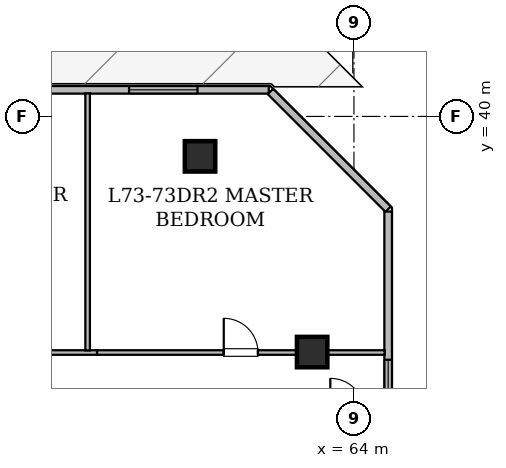
"""IFC4 building model, lengths in metres.
Left out: names, types, materials, properties, quantities, classifications, styles, units other than length and angle.
Written with IfcOpenShell. Run it as: python <this file> out.ifc"""

import sys

from ifc_helpers import new_model, si_unit, direction, frame, frame_2d, origin, origin_2d, place, context, subcontext, project, spatial, rectangle, hollow_rectangle, extrude, element, fill, save


model = new_model("IFC4")
c1 = context("Model", 3, precision=1e-05, world=origin(), true_north=direction((0.0, 1.0)))
c2 = subcontext(c1, "Body", "Model", "MODEL_VIEW")
j1 = project(units=[si_unit("LENGTHUNIT", "METRE"), si_unit("PLANEANGLEUNIT", "RADIAN")], contexts=[c1])
p1 = place(None, origin())
s1 = spatial("IfcSite", under=j1, at=p1, CompositionType="ELEMENT")
p2 = place(p1, origin())
s2 = spatial("IfcBuilding", under=s1, at=p2, CompositionType="ELEMENT")
p3 = place(p2, frame((0.0, 0.0, 286.25)))
s3 = spatial("IfcBuildingStorey", under=s2, at=p3, CompositionType="ELEMENT", Elevation=286.25)
for number, where, z_axis, x_axis in (
    (1, (59.95, 38.95, 0.025), (0.0, 0.0, 1.0), (1.0, 0.0, 0.0)),
    (2, (62.9, 33.8, 0.025), (0.0, 0.0, 1.0), (1.0, 0.0, 0.0)),
):
    element("IfcColumn", number, at=place(p3, frame(where, z_axis=z_axis, x_axis=x_axis)), inside=s3, PredefinedType="COLUMN", context=c2, shape_type="SweptSolid", body=[
        extrude(hollow_rectangle(XDim=0.8, YDim=0.8, WallThickness=0.04, at=origin_2d()), origin(), (0.0, 0.0, 1.0), 4.175),
    ])
p4 = place(p3, frame((28.302, 40.7, 0.0), z_axis=(0.0, 0.0, 1.0), x_axis=(1.0, 0.0, 0.0)))
e3 = element("IfcWall", 3, at=p4, inside=s3, PredefinedType="STANDARD", context=c2, shape_type="SweptSolid", body=[
    extrude(rectangle(XDim=33.457, YDim=0.2, at=frame_2d((16.729, 0.0))), origin(), (0.0, 0.0, 1.0), 3.95),
])
p5 = place(p4, frame((19.017, 0.0, 0.0)))
e4 = element("IfcOpeningElement", 4, at=p5, cuts=e3, PredefinedType="OPENING", context=c2, shape_type="SweptSolid", body=[
    extrude(rectangle(XDim=1.0, YDim=2.15, at=frame_2d((0.5, 1.075))), frame((0.0, 0.11, 0.0), z_axis=(0.0, -1.0, 0.0), x_axis=(1.0, 0.0, 0.0)), (0.0, 0.0, 1.0), 0.22),
])
p6 = place(p4, frame((16.033, 0.0, 0.78)))
e5 = element("IfcOpeningElement", 5, at=p6, cuts=e3, PredefinedType="OPENING", context=c2, shape_type="SweptSolid", body=[
    extrude(rectangle(XDim=1.2, YDim=1.5, at=frame_2d((0.6, 0.75))), frame((0.0, 0.11, 0.0), z_axis=(0.0, -1.0, 0.0), x_axis=(1.0, 0.0, 0.0)), (0.0, 0.0, 1.0), 0.22),
])
p7 = place(p4, frame((24.546, 0.0, 0.85)))
e6 = element("IfcOpeningElement", 6, at=p7, cuts=e3, PredefinedType="OPENING", context=c2, shape_type="SweptSolid", body=[
    extrude(rectangle(XDim=1.8, YDim=0.92, at=frame_2d((0.9, 0.46))), frame((0.0, 0.11, 0.0), z_axis=(0.0, -1.0, 0.0), x_axis=(1.0, 0.0, 0.0)), (0.0, 0.0, 1.0), 0.22),
])
p8 = place(p4, frame((29.781, 0.0, 0.85)))
e7 = element("IfcOpeningElement", 7, at=p8, cuts=e3, PredefinedType="OPENING", context=c2, shape_type="SweptSolid", body=[
    extrude(rectangle(XDim=1.8, YDim=0.92, at=frame_2d((0.9, 0.46))), frame((0.0, 0.11, 0.0), z_axis=(0.0, -1.0, 0.0), x_axis=(1.0, 0.0, 0.0)), (0.0, 0.0, 1.0), 0.22),
])
p9 = place(p3, frame((61.803, 40.656, 0.0), z_axis=(0.0, 0.0, 1.0), x_axis=(0.707106781187, -0.707106781187, 0.0)))
e8 = element("IfcWall", 8, at=p9, inside=s3, PredefinedType="STANDARD", context=c2, shape_type="SweptSolid", body=[
    extrude(rectangle(XDim=4.38, YDim=0.2, at=frame_2d((2.19, 0.0))), origin(), (0.0, 0.0, 1.0), 3.95),
])
p10 = place(p3, frame((64.9, 37.497, 0.0), z_axis=(0.0, 0.0, 1.0), x_axis=(0.0, -1.0, 0.0)))
e9 = element("IfcWall", 9, at=p10, inside=s3, PredefinedType="STANDARD", context=c2, shape_type="SweptSolid", body=[
    extrude(rectangle(XDim=7.067, YDim=0.2, at=frame_2d((3.534, 0.0))), origin(), (0.0, 0.0, 1.0), 3.95),
])
p11 = place(p10, frame((3.899, 0.0, 0.78)))
e10 = element("IfcOpeningElement", 10, at=p11, cuts=e9, PredefinedType="OPENING", context=c2, shape_type="SweptSolid", body=[
    extrude(rectangle(XDim=1.2, YDim=1.5, at=frame_2d((0.6, 0.75))), frame((0.0, 0.11, 0.0), z_axis=(0.0, -1.0, 0.0), x_axis=(1.0, 0.0, 0.0)), (0.0, 0.0, 1.0), 0.22),
])
p12 = place(p3, frame((50.577, 33.788, 0.0), z_axis=(0.0, 0.0, 1.0), x_axis=(1.0, 0.0, 0.0)))
e11 = element("IfcWall", 11, at=p12, inside=s3, PredefinedType="PARTITIONING", context=c2, shape_type="SweptSolid", body=[
    extrude(rectangle(XDim=6.664, YDim=0.12, at=frame_2d((3.332, 0.0))), origin(), (0.0, 0.0, 1.0), 3.245),
])
p13 = place(p12, frame((2.861, 0.0, 0.0)))
e12 = element("IfcOpeningElement", 12, at=p13, cuts=e11, PredefinedType="OPENING", context=c2, shape_type="SweptSolid", body=[
    extrude(rectangle(XDim=0.9, YDim=2.1, at=frame_2d((0.45, 1.05))), frame((0.0, 0.07, 0.0), z_axis=(0.0, -1.0, 0.0), x_axis=(1.0, 0.0, 0.0)), (0.0, 0.0, 1.0), 0.14),
])
p14 = place(p3, frame((57.241, 33.788, 0.0), z_axis=(0.0, 0.0, 1.0), x_axis=(1.0, 0.0, 0.0)))
e13 = element("IfcWall", 13, at=p14, inside=s3, PredefinedType="PARTITIONING", context=c2, shape_type="SweptSolid", body=[
    extrude(rectangle(XDim=7.567, YDim=0.12, at=frame_2d((3.784, 0.0))), origin(), (0.0, 0.0, 1.0), 3.245),
])
p15 = place(p14, frame((3.333, 0.0, 0.0)))
e14 = element("IfcOpeningElement", 14, at=p15, cuts=e13, PredefinedType="OPENING", context=c2, shape_type="SweptSolid", body=[
    extrude(rectangle(XDim=0.9, YDim=2.1, at=frame_2d((0.45, 1.05))), frame((0.0, 0.07, 0.0), z_axis=(0.0, -1.0, 0.0), x_axis=(1.0, 0.0, 0.0)), (0.0, 0.0, 1.0), 0.14),
])
p16 = place(p3, frame((56.992, 40.608, 0.0), z_axis=(0.0, 0.0, 1.0), x_axis=(0.0, -1.0, 0.0)))
e15 = element("IfcWall", 15, at=p16, inside=s3, PredefinedType="PARTITIONING", context=c2, shape_type="SweptSolid", body=[
    extrude(rectangle(XDim=6.766, YDim=0.12, at=frame_2d((3.383, 0.0))), origin(), (0.0, 0.0, 1.0), 3.245),
])
p17 = place(p11, origin())
e16 = element("IfcWindow", 16, at=p17, inside=s3, PartitioningType="SINGLE_PANEL", PredefinedType="WINDOW", context=c2, shape_type="SweptSolid", body=[
    extrude(rectangle(XDim=1.2, YDim=1.5, at=frame_2d((0.6, 0.75))), frame((0.0, 0.03, 0.0), z_axis=(0.0, -1.0, 0.0), x_axis=(1.0, 0.0, 0.0)), (0.0, 0.0, 1.0), 0.06),
])
fill(e10, e16)
p18 = place(p8, origin())
e17 = element("IfcWindow", 17, at=p18, inside=s3, PartitioningType="SINGLE_PANEL", PredefinedType="WINDOW", context=c2, shape_type="SweptSolid", body=[
    extrude(rectangle(XDim=1.8, YDim=0.92, at=frame_2d((0.9, 0.46))), frame((0.0, 0.03, 0.0), z_axis=(0.0, -1.0, 0.0), x_axis=(1.0, 0.0, 0.0)), (0.0, 0.0, 1.0), 0.06),
])
fill(e7, e17)
p19 = place(p15, origin())
e18 = element("IfcDoor", 18, at=p19, inside=s3, OperationType="SINGLE_SWING_LEFT", PredefinedType="DOOR", context=c2, shape_type="SweptSolid", body=[
    extrude(rectangle(XDim=0.9, YDim=2.1, at=frame_2d((0.45, 1.05))), frame((0.0, 0.025, 0.0), z_axis=(0.0, -1.0, 0.0), x_axis=(1.0, 0.0, 0.0)), (0.0, 0.0, 1.0), 0.05),
])
fill(e14, e18)
save(model, sys.argv[1])
